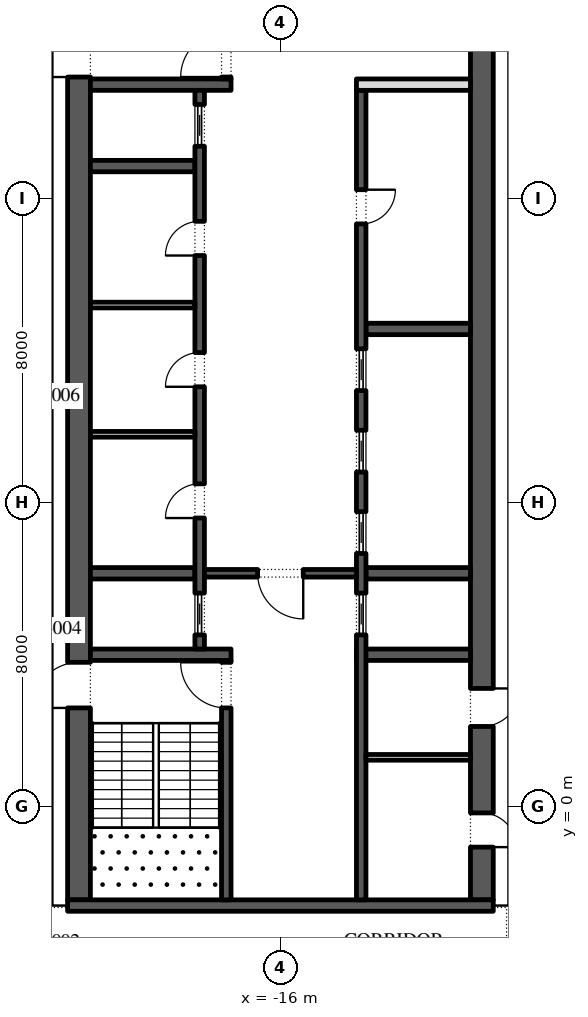
"""IFC4 building model, lengths in metres.
Left out: names, types, materials, properties, quantities, classifications, styles, units other than length and angle.
Written with IfcOpenShell. Run it as: python <this file> out.ifc"""

import sys

from ifc_helpers import new_model, si_unit, direction, frame, frame_2d, origin, place, context, subcontext, project, spatial, rectangle, extrude, element, fill, save


model = new_model("IFC4")
c1 = context("Model", 3, precision=1e-05, world=origin(), true_north=direction((0.0, 1.0)))
c2 = subcontext(c1, "Body", "Model", "MODEL_VIEW")
j1 = project(units=[si_unit("LENGTHUNIT", "METRE"), si_unit("PLANEANGLEUNIT", "RADIAN")], contexts=[c1])
p1 = place(None, origin())
s1 = spatial("IfcSite", under=j1, at=p1, CompositionType="ELEMENT")
p2 = place(p1, origin())
s2 = spatial("IfcBuilding", under=s1, at=p2, CompositionType="ELEMENT")
p3 = place(p2, frame((0.0, 0.0, 276.6)))
s3 = spatial("IfcBuildingStorey", under=s2, at=p3, CompositionType="ELEMENT", Elevation=276.6)
p4 = place(p3, frame((-21.359, 48.678, 0.0), z_axis=(0.0, 0.0, 1.0), x_axis=(-0.224949198343, -0.974370493275, 0.0)))
e1 = element("IfcWall", 1, at=p4, inside=s3, PredefinedType="STANDARD", context=c2, shape_type="SweptSolid", body=[
    extrude(rectangle(XDim=49.5, YDim=0.3, at=frame_2d((24.75, 0.0))), origin(), (0.0, 0.0, 1.0), 4.0),
])
p5 = place(p4, frame((1.157, 0.0, 0.45)))
e2 = element("IfcOpeningElement", 2, at=p5, cuts=e1, PredefinedType="OPENING", context=c2, shape_type="SweptSolid", body=[
    extrude(rectangle(XDim=4.5, YDim=3.05, at=frame_2d((2.25, 1.525))), frame((0.0, 0.16, 0.0), z_axis=(0.0, -1.0, 0.0), x_axis=(1.0, 0.0, 0.0)), (0.0, 0.0, 1.0), 0.32),
])
p6 = place(p4, frame((9.171, 0.0, 0.0)))
e3 = element("IfcOpeningElement", 3, at=p6, cuts=e1, PredefinedType="OPENING", context=c2, shape_type="SweptSolid", body=[
    extrude(rectangle(XDim=2.4, YDim=3.5, at=frame_2d((1.2, 1.75))), frame((0.0, 0.16, 0.0), z_axis=(0.0, -1.0, 0.0), x_axis=(1.0, 0.0, 0.0)), (0.0, 0.0, 1.0), 0.32),
])
p7 = place(p4, frame((15.236, 0.0, 0.45)))
e4 = element("IfcOpeningElement", 4, at=p7, cuts=e1, PredefinedType="OPENING", context=c2, shape_type="SweptSolid", body=[
    extrude(rectangle(XDim=4.5, YDim=3.05, at=frame_2d((2.25, 1.525))), frame((0.0, 0.16, 0.0), z_axis=(0.0, -1.0, 0.0), x_axis=(1.0, 0.0, 0.0)), (0.0, 0.0, 1.0), 0.32),
])
p8 = place(p4, frame((22.35, 0.0, 0.45)))
e5 = element("IfcOpeningElement", 5, at=p8, cuts=e1, PredefinedType="OPENING", context=c2, shape_type="SweptSolid", body=[
    extrude(rectangle(XDim=4.5, YDim=3.05, at=frame_2d((2.25, 1.525))), frame((0.0, 0.16, 0.0), z_axis=(0.0, -1.0, 0.0), x_axis=(1.0, 0.0, 0.0)), (0.0, 0.0, 1.0), 0.32),
])
p9 = place(p4, frame((29.464, 0.0, 0.45)))
e6 = element("IfcOpeningElement", 6, at=p9, cuts=e1, PredefinedType="OPENING", context=c2, shape_type="SweptSolid", body=[
    extrude(rectangle(XDim=4.5, YDim=3.05, at=frame_2d((2.25, 1.525))), frame((0.0, 0.16, 0.0), z_axis=(0.0, -1.0, 0.0), x_axis=(1.0, 0.0, 0.0)), (0.0, 0.0, 1.0), 0.32),
])
p10 = place(p4, frame((37.628, 0.0, 0.0)))
e7 = element("IfcOpeningElement", 7, at=p10, cuts=e1, PredefinedType="OPENING", context=c2, shape_type="SweptSolid", body=[
    extrude(rectangle(XDim=2.4, YDim=3.325, at=frame_2d((1.2, 1.663))), frame((0.0, 0.16, 0.0), z_axis=(0.0, -1.0, 0.0), x_axis=(1.0, 0.0, 0.0)), (0.0, 0.0, 1.0), 0.32),
])
p11 = place(p4, frame((43.693, 0.0, 0.45)))
e8 = element("IfcOpeningElement", 8, at=p11, cuts=e1, PredefinedType="OPENING", context=c2, shape_type="SweptSolid", body=[
    extrude(rectangle(XDim=4.5, YDim=2.825, at=frame_2d((2.25, 1.413))), frame((0.0, 0.16, 0.0), z_axis=(0.0, -1.0, 0.0), x_axis=(1.0, 0.0, 0.0)), (0.0, 0.0, 1.0), 0.32),
])
p12 = place(p3, frame((-21.3, -2.45, 0.0), z_axis=(0.0, 0.0, 1.0), x_axis=(0.0, 1.0, 0.0)))
e9 = element("IfcWall", 9, at=p12, inside=s3, PredefinedType="SHEAR", context=c2, shape_type="SweptSolid", body=[
    extrude(rectangle(XDim=27.9, YDim=0.6, at=frame_2d((13.95, 0.0))), origin(), (0.0, 0.0, 1.0), 4.0),
])
p13 = place(p12, frame((5.05, 0.0, 0.0)))
e10 = element("IfcOpeningElement", 10, at=p13, cuts=e9, PredefinedType="OPENING", context=c2, shape_type="SweptSolid", body=[
    extrude(rectangle(XDim=1.2, YDim=2.1, at=frame_2d((0.6, 1.05))), frame((0.0, 0.31, 0.0), z_axis=(0.0, -1.0, 0.0), x_axis=(1.0, 0.0, 0.0)), (0.0, 0.0, 1.0), 0.62),
])
p14 = place(p12, frame((21.65, 0.0, 0.0)))
e11 = element("IfcOpeningElement", 11, at=p14, cuts=e9, PredefinedType="OPENING", context=c2, shape_type="SweptSolid", body=[
    extrude(rectangle(XDim=1.2, YDim=2.1, at=frame_2d((0.6, 1.05))), frame((0.0, 0.31, 0.0), z_axis=(0.0, -1.0, 0.0), x_axis=(1.0, 0.0, 0.0)), (0.0, 0.0, 1.0), 0.62),
])
p15 = place(p3, frame((-10.7, -2.45, 0.0), z_axis=(0.0, 0.0, 1.0), x_axis=(0.0, 1.0, 0.0)))
e12 = element("IfcWall", 12, at=p15, inside=s3, PredefinedType="SHEAR", context=c2, shape_type="SweptSolid", body=[
    extrude(rectangle(XDim=27.9, YDim=0.6, at=frame_2d((13.95, 0.0))), origin(), (0.0, 0.0, 1.0), 4.0),
])
p16 = place(p15, frame((23.65, 0.0, 0.0)))
e13 = element("IfcOpeningElement", 13, at=p16, cuts=e12, PredefinedType="OPENING", context=c2, shape_type="SweptSolid", body=[
    extrude(rectangle(XDim=2.4, YDim=2.1, at=frame_2d((1.2, 1.05))), frame((0.0, 0.31, 0.0), z_axis=(0.0, -1.0, 0.0), x_axis=(1.0, 0.0, 0.0)), (0.0, 0.0, 1.0), 0.62),
])
p17 = place(p15, frame((1.387, 0.0, 0.0)))
e14 = element("IfcOpeningElement", 14, at=p17, cuts=e12, PredefinedType="OPENING", context=c2, shape_type="SweptSolid", body=[
    extrude(rectangle(XDim=0.9, YDim=2.1, at=frame_2d((0.45, 1.05))), frame((0.0, 0.31, 0.0), z_axis=(0.0, -1.0, 0.0), x_axis=(1.0, 0.0, 0.0)), (0.0, 0.0, 1.0), 0.62),
])
p18 = place(p15, frame((4.562, 0.0, 0.0)))
e15 = element("IfcOpeningElement", 15, at=p18, cuts=e12, PredefinedType="OPENING", context=c2, shape_type="SweptSolid", body=[
    extrude(rectangle(XDim=1.0, YDim=2.1, at=frame_2d((0.5, 1.05))), frame((0.0, 0.31, 0.0), z_axis=(0.0, -1.0, 0.0), x_axis=(1.0, 0.0, 0.0)), (0.0, 0.0, 1.0), 0.62),
])
p19 = place(p3, frame((-21.6, -2.6, 0.0), z_axis=(0.0, 0.0, 1.0), x_axis=(1.0, 0.0, 0.0)))
e16 = element("IfcWall", 16, at=p19, inside=s3, PredefinedType="SHEAR", context=c2, shape_type="SweptSolid", body=[
    extrude(rectangle(XDim=11.2, YDim=0.3, at=frame_2d((5.6, 0.0))), origin(), (0.0, 0.0, 1.0), 4.0),
])
p20 = place(p3, frame((-21.0, 4.0, 0.0), z_axis=(0.0, 0.0, 1.0), x_axis=(1.0, 0.0, 0.0)))
e17 = element("IfcWall", 17, at=p20, inside=s3, PredefinedType="SHEAR", context=c2, shape_type="SweptSolid", body=[
    extrude(rectangle(XDim=3.7, YDim=0.3, at=frame_2d((1.85, 0.0))), origin(), (0.0, 0.0, 1.0), 4.0),
])
p21 = place(p3, frame((-17.425, -2.45, 0.0), z_axis=(0.0, 0.0, 1.0), x_axis=(0.0, 1.0, 0.0)))
e18 = element("IfcWall", 18, at=p21, inside=s3, PredefinedType="SHEAR", context=c2, shape_type="SweptSolid", body=[
    extrude(rectangle(XDim=6.3, YDim=0.25, at=frame_2d((3.15, 0.0))), origin(), (0.0, 0.0, 1.0), 4.0),
])
p22 = place(p21, frame((5.05, 0.0, 0.0)))
e19 = element("IfcOpeningElement", 19, at=p22, cuts=e18, PredefinedType="OPENING", context=c2, shape_type="SweptSolid", body=[
    extrude(rectangle(XDim=1.2, YDim=2.1, at=frame_2d((0.6, 1.05))), frame((0.0, 0.135, 0.0), z_axis=(0.0, -1.0, 0.0), x_axis=(1.0, 0.0, 0.0)), (0.0, 0.0, 1.0), 0.27),
])
p23 = place(p3, frame((-21.0, 19.0, 0.0), z_axis=(0.0, 0.0, 1.0), x_axis=(1.0, 0.0, 0.0)))
e20 = element("IfcWall", 20, at=p23, inside=s3, PredefinedType="SHEAR", context=c2, shape_type="SweptSolid", body=[
    extrude(rectangle(XDim=3.7, YDim=0.3, at=frame_2d((1.85, 0.0))), origin(), (0.0, 0.0, 1.0), 4.0),
])
p24 = place(p3, frame((-17.425, 19.15, 0.0), z_axis=(0.0, 0.0, 1.0), x_axis=(0.0, 1.0, 0.0)))
e21 = element("IfcWall", 21, at=p24, inside=s3, PredefinedType="SHEAR", context=c2, shape_type="SweptSolid", body=[
    extrude(rectangle(XDim=6.3, YDim=0.25, at=frame_2d((3.15, 0.0))), origin(), (0.0, 0.0, 1.0), 4.0),
])
p25 = place(p24, frame((0.05, 0.0, 0.0)))
e22 = element("IfcOpeningElement", 22, at=p25, cuts=e21, PredefinedType="OPENING", context=c2, shape_type="SweptSolid", body=[
    extrude(rectangle(XDim=1.2, YDim=2.1, at=frame_2d((0.6, 1.05))), frame((0.0, 0.135, 0.0), z_axis=(0.0, -1.0, 0.0), x_axis=(1.0, 0.0, 0.0)), (0.0, 0.0, 1.0), 0.27),
])
for number, where, z_axis, x_axis in (
    (23, (-21.0, 6.143, 0.0), (0.0, 0.0, 1.0), (1.0, 0.0, 0.0)),
    (24, (-21.0, 16.857, 0.0), (0.0, 0.0, 1.0), (1.0, 0.0, 0.0)),
):
    element("IfcWall", number, at=place(p3, frame(where, z_axis=z_axis, x_axis=x_axis)), inside=s3, PredefinedType="SHEAR", context=c2, shape_type="SweptSolid", body=[
        extrude(rectangle(XDim=2.75, YDim=0.3, at=frame_2d((1.375, 0.0))), origin(), (0.0, 0.0, 1.0), 4.0),
    ])
p26 = place(p3, frame((-18.125, 4.15, 0.0), z_axis=(0.0, 0.0, 1.0), x_axis=(0.0, 1.0, 0.0)))
e25 = element("IfcWall", 25, at=p26, inside=s3, PredefinedType="SHEAR", context=c2, shape_type="SweptSolid", body=[
    extrude(rectangle(XDim=14.7, YDim=0.25, at=frame_2d((7.35, 0.0))), origin(), (0.0, 0.0, 1.0), 4.0),
])
p27 = place(p26, frame((3.446, 0.0, 0.0)))
e26 = element("IfcOpeningElement", 26, at=p27, cuts=e25, PredefinedType="OPENING", context=c2, shape_type="SweptSolid", body=[
    extrude(rectangle(XDim=0.9, YDim=2.1, at=frame_2d((0.45, 1.05))), frame((0.0, 0.135, 0.0), z_axis=(0.0, -1.0, 0.0), x_axis=(1.0, 0.0, 0.0)), (0.0, 0.0, 1.0), 0.27),
])
p28 = place(p26, frame((6.9, 0.0, 0.0)))
e27 = element("IfcOpeningElement", 27, at=p28, cuts=e25, PredefinedType="OPENING", context=c2, shape_type="SweptSolid", body=[
    extrude(rectangle(XDim=0.9, YDim=2.1, at=frame_2d((0.45, 1.05))), frame((0.0, 0.135, 0.0), z_axis=(0.0, -1.0, 0.0), x_axis=(1.0, 0.0, 0.0)), (0.0, 0.0, 1.0), 0.27),
])
p29 = place(p26, frame((10.354, 0.0, 0.0)))
e28 = element("IfcOpeningElement", 28, at=p29, cuts=e25, PredefinedType="OPENING", context=c2, shape_type="SweptSolid", body=[
    extrude(rectangle(XDim=0.9, YDim=2.1, at=frame_2d((0.45, 1.05))), frame((0.0, 0.135, 0.0), z_axis=(0.0, -1.0, 0.0), x_axis=(1.0, 0.0, 0.0)), (0.0, 0.0, 1.0), 0.27),
])
p30 = place(p26, frame((0.371, 0.0, 0.0)))
e29 = element("IfcOpeningElement", 29, at=p30, cuts=e25, PredefinedType="OPENING", context=c2, shape_type="SweptSolid", body=[
    extrude(rectangle(XDim=1.1, YDim=2.1, at=frame_2d((0.55, 1.05))), frame((0.0, 0.135, 0.0), z_axis=(0.0, -1.0, 0.0), x_axis=(1.0, 0.0, 0.0)), (0.0, 0.0, 1.0), 0.27),
])
p31 = place(p26, frame((13.229, 0.0, 0.0)))
e30 = element("IfcOpeningElement", 30, at=p31, cuts=e25, PredefinedType="OPENING", context=c2, shape_type="SweptSolid", body=[
    extrude(rectangle(XDim=1.1, YDim=2.1, at=frame_2d((0.55, 1.05))), frame((0.0, 0.135, 0.0), z_axis=(0.0, -1.0, 0.0), x_axis=(1.0, 0.0, 0.0)), (0.0, 0.0, 1.0), 0.27),
])
for number, where, z_axis, x_axis in (
    (31, (-21.0, 9.8, 0.0), (0.0, 0.0, 1.0), (1.0, 0.0, 0.0)),
    (32, (-21.0, 13.2, 0.0), (0.0, 0.0, 1.0), (1.0, 0.0, 0.0)),
):
    element("IfcWall", number, at=place(p3, frame(where, z_axis=z_axis, x_axis=x_axis)), inside=s3, PredefinedType="PARTITIONING", context=c2, shape_type="SweptSolid", body=[
        extrude(rectangle(XDim=2.75, YDim=0.15, at=frame_2d((1.375, 0.0))), origin(), (0.0, 0.0, 1.0), 4.0),
    ])
p32 = place(p3, frame((-14.0, 4.0, 0.0), z_axis=(0.0, 0.0, 1.0), x_axis=(1.0, 0.0, 0.0)))
e33 = element("IfcWall", 33, at=p32, inside=s3, PredefinedType="SHEAR", context=c2, shape_type="SweptSolid", body=[
    extrude(rectangle(XDim=3.0, YDim=0.3, at=frame_2d((1.5, 0.0))), origin(), (0.0, 0.0, 1.0), 4.0),
])
for number, where, z_axis, x_axis in (
    (34, (-13.75, 6.143, 0.0), (0.0, 0.0, 1.0), (1.0, 0.0, 0.0)),
    (35, (-13.75, 12.571, 0.0), (0.0, 0.0, 1.0), (1.0, 0.0, 0.0)),
):
    element("IfcWall", number, at=place(p3, frame(where, z_axis=z_axis, x_axis=x_axis)), inside=s3, PredefinedType="SHEAR", context=c2, shape_type="SweptSolid", body=[
        extrude(rectangle(XDim=2.75, YDim=0.3, at=frame_2d((1.375, 0.0))), origin(), (0.0, 0.0, 1.0), 4.0),
    ])
p33 = place(p3, frame((-13.875, -2.45, 0.0), z_axis=(0.0, 0.0, 1.0), x_axis=(0.0, 1.0, 0.0)))
e36 = element("IfcWall", 36, at=p33, inside=s3, PredefinedType="SHEAR", context=c2, shape_type="SweptSolid", body=[
    extrude(rectangle(XDim=21.3, YDim=0.25, at=frame_2d((10.65, 0.0))), origin(), (0.0, 0.0, 1.0), 4.0),
])
p34 = place(p33, frame((17.786, 0.0, 0.0)))
e37 = element("IfcOpeningElement", 37, at=p34, cuts=e36, PredefinedType="OPENING", context=c2, shape_type="SweptSolid", body=[
    extrude(rectangle(XDim=0.9, YDim=2.1, at=frame_2d((0.45, 1.05))), frame((0.0, 0.135, 0.0), z_axis=(0.0, -1.0, 0.0), x_axis=(1.0, 0.0, 0.0)), (0.0, 0.0, 1.0), 0.27),
])
p35 = place(p33, frame((6.971, 0.0, 0.0)))
e38 = element("IfcOpeningElement", 38, at=p35, cuts=e36, PredefinedType="OPENING", context=c2, shape_type="SweptSolid", body=[
    extrude(rectangle(XDim=1.1, YDim=2.1, at=frame_2d((0.55, 1.05))), frame((0.0, 0.135, 0.0), z_axis=(0.0, -1.0, 0.0), x_axis=(1.0, 0.0, 0.0)), (0.0, 0.0, 1.0), 0.27),
])
p36 = place(p33, frame((9.114, 0.0, 0.0)))
e39 = element("IfcOpeningElement", 39, at=p36, cuts=e36, PredefinedType="OPENING", context=c2, shape_type="SweptSolid", body=[
    extrude(rectangle(XDim=1.1, YDim=2.1, at=frame_2d((0.55, 1.05))), frame((0.0, 0.135, 0.0), z_axis=(0.0, -1.0, 0.0), x_axis=(1.0, 0.0, 0.0)), (0.0, 0.0, 1.0), 0.27),
])
p37 = place(p33, frame((11.257, 0.0, 0.0)))
e40 = element("IfcOpeningElement", 40, at=p37, cuts=e36, PredefinedType="OPENING", context=c2, shape_type="SweptSolid", body=[
    extrude(rectangle(XDim=1.1, YDim=2.1, at=frame_2d((0.55, 1.05))), frame((0.0, 0.135, 0.0), z_axis=(0.0, -1.0, 0.0), x_axis=(1.0, 0.0, 0.0)), (0.0, 0.0, 1.0), 0.27),
])
p38 = place(p33, frame((13.4, 0.0, 0.0)))
e41 = element("IfcOpeningElement", 41, at=p38, cuts=e36, PredefinedType="OPENING", context=c2, shape_type="SweptSolid", body=[
    extrude(rectangle(XDim=1.1, YDim=2.1, at=frame_2d((0.55, 1.05))), frame((0.0, 0.135, 0.0), z_axis=(0.0, -1.0, 0.0), x_axis=(1.0, 0.0, 0.0)), (0.0, 0.0, 1.0), 0.27),
])
p39 = place(p3, frame((-14.0, 19.0, 0.0), z_axis=(0.0, 0.0, 1.0), x_axis=(1.0, 0.0, 0.0)))
e42 = element("IfcWall", 42, at=p39, inside=s3, PredefinedType="PARTITIONING", context=c2, shape_type="SweptSolid", body=[
    extrude(rectangle(XDim=3.0, YDim=0.3, at=frame_2d((1.5, 0.0))), origin(), (0.0, 0.0, 1.0), 4.0),
])
p40 = place(p3, frame((-18.0, 6.143, 0.0), z_axis=(0.0, 0.0, 1.0), x_axis=(1.0, 0.0, 0.0)))
e43 = element("IfcWall", 43, at=p40, inside=s3, PredefinedType="SHEAR", context=c2, shape_type="SweptSolid", body=[
    extrude(rectangle(XDim=4.0, YDim=0.2, at=frame_2d((2.0, 0.0))), origin(), (0.0, 0.0, 1.0), 4.0),
])
p41 = place(p40, frame((1.4, 0.0, 0.0)))
e44 = element("IfcOpeningElement", 44, at=p41, cuts=e43, PredefinedType="OPENING", context=c2, shape_type="SweptSolid", body=[
    extrude(rectangle(XDim=1.2, YDim=2.1, at=frame_2d((0.6, 1.05))), frame((0.0, 0.11, 0.0), z_axis=(0.0, -1.0, 0.0), x_axis=(1.0, 0.0, 0.0)), (0.0, 0.0, 1.0), 0.22),
])
p42 = place(p3, frame((-13.75, 1.3, 0.0), z_axis=(0.0, 0.0, 1.0), x_axis=(1.0, 0.0, 0.0)))
e45 = element("IfcWall", 45, at=p42, inside=s3, PredefinedType="PARTITIONING", context=c2, shape_type="SweptSolid", body=[
    extrude(rectangle(XDim=2.75, YDim=0.15, at=frame_2d((1.375, 0.0))), origin(), (0.0, 0.0, 1.0), 4.0),
])
p43 = place(p27, origin())
e46 = element("IfcDoor", 46, at=p43, inside=s3, OperationType="SINGLE_SWING_RIGHT", PredefinedType="DOOR", context=c2, shape_type="SweptSolid", body=[
    extrude(rectangle(XDim=0.9, YDim=2.1, at=frame_2d((0.45, 1.05))), frame((0.0, 0.125, 0.0), z_axis=(0.0, -1.0, 0.0), x_axis=(1.0, 0.0, 0.0)), (0.0, 0.0, 1.0), 0.05),
])
fill(e26, e46)
p44 = place(p28, origin())
e47 = element("IfcDoor", 47, at=p44, inside=s3, OperationType="SINGLE_SWING_RIGHT", PredefinedType="DOOR", context=c2, shape_type="SweptSolid", body=[
    extrude(rectangle(XDim=0.9, YDim=2.1, at=frame_2d((0.45, 1.05))), frame((0.0, 0.125, 0.0), z_axis=(0.0, -1.0, 0.0), x_axis=(1.0, 0.0, 0.0)), (0.0, 0.0, 1.0), 0.05),
])
fill(e27, e47)
p45 = place(p29, origin())
e48 = element("IfcDoor", 48, at=p45, inside=s3, OperationType="SINGLE_SWING_RIGHT", PredefinedType="DOOR", context=c2, shape_type="SweptSolid", body=[
    extrude(rectangle(XDim=0.9, YDim=2.1, at=frame_2d((0.45, 1.05))), frame((0.0, 0.125, 0.0), z_axis=(0.0, -1.0, 0.0), x_axis=(1.0, 0.0, 0.0)), (0.0, 0.0, 1.0), 0.05),
])
fill(e28, e48)
p46 = place(p30, origin())
e49 = element("IfcDoor", 49, at=p46, inside=s3, OperationType="SLIDING_TO_LEFT", PredefinedType="DOOR", context=c2, shape_type="SweptSolid", body=[
    extrude(rectangle(XDim=1.1, YDim=2.1, at=frame_2d((0.55, 1.05))), frame((0.0, 0.025, 0.0), z_axis=(0.0, -1.0, 0.0), x_axis=(1.0, 0.0, 0.0)), (0.0, 0.0, 1.0), 0.05),
])
fill(e29, e49)
p47 = place(p31, origin())
e50 = element("IfcDoor", 50, at=p47, inside=s3, OperationType="SLIDING_TO_LEFT", PredefinedType="DOOR", context=c2, shape_type="SweptSolid", body=[
    extrude(rectangle(XDim=1.1, YDim=2.1, at=frame_2d((0.55, 1.05))), frame((0.0, 0.025, 0.0), z_axis=(0.0, -1.0, 0.0), x_axis=(1.0, 0.0, 0.0)), (0.0, 0.0, 1.0), 0.05),
])
fill(e30, e50)
p48 = place(p34, frame((0.9, -0.2, 0.0), z_axis=(0.0, 0.0, 1.0), x_axis=(-1.0, 0.0, 0.0)))
e51 = element("IfcDoor", 51, at=p48, inside=s3, OperationType="SINGLE_SWING_RIGHT", PredefinedType="DOOR", context=c2, shape_type="SweptSolid", body=[
    extrude(rectangle(XDim=0.9, YDim=2.1, at=frame_2d((0.45, 1.05))), frame((0.0, -0.075, 0.0), z_axis=(0.0, -1.0, 0.0), x_axis=(1.0, 0.0, 0.0)), (0.0, 0.0, 1.0), 0.05),
])
fill(e37, e51)
p49 = place(p35, origin())
e52 = element("IfcDoor", 52, at=p49, inside=s3, OperationType="SLIDING_TO_LEFT", PredefinedType="DOOR", context=c2, shape_type="SweptSolid", body=[
    extrude(rectangle(XDim=1.1, YDim=2.1, at=frame_2d((0.55, 1.05))), frame((0.0, 0.025, 0.0), z_axis=(0.0, -1.0, 0.0), x_axis=(1.0, 0.0, 0.0)), (0.0, 0.0, 1.0), 0.05),
])
fill(e38, e52)
p50 = place(p36, origin())
e53 = element("IfcDoor", 53, at=p50, inside=s3, OperationType="SLIDING_TO_LEFT", PredefinedType="DOOR", context=c2, shape_type="SweptSolid", body=[
    extrude(rectangle(XDim=1.1, YDim=2.1, at=frame_2d((0.55, 1.05))), frame((0.0, 0.025, 0.0), z_axis=(0.0, -1.0, 0.0), x_axis=(1.0, 0.0, 0.0)), (0.0, 0.0, 1.0), 0.05),
])
fill(e39, e53)
p51 = place(p37, origin())
e54 = element("IfcDoor", 54, at=p51, inside=s3, OperationType="SLIDING_TO_LEFT", PredefinedType="DOOR", context=c2, shape_type="SweptSolid", body=[
    extrude(rectangle(XDim=1.1, YDim=2.1, at=frame_2d((0.55, 1.05))), frame((0.0, 0.025, 0.0), z_axis=(0.0, -1.0, 0.0), x_axis=(1.0, 0.0, 0.0)), (0.0, 0.0, 1.0), 0.05),
])
fill(e40, e54)
p52 = place(p38, origin())
e55 = element("IfcDoor", 55, at=p52, inside=s3, OperationType="SLIDING_TO_LEFT", PredefinedType="DOOR", context=c2, shape_type="SweptSolid", body=[
    extrude(rectangle(XDim=1.1, YDim=2.1, at=frame_2d((0.55, 1.05))), frame((0.0, 0.025, 0.0), z_axis=(0.0, -1.0, 0.0), x_axis=(1.0, 0.0, 0.0)), (0.0, 0.0, 1.0), 0.05),
])
fill(e41, e55)
p53 = place(p41, frame((1.2, 0.0, 0.0), z_axis=(0.0, 0.0, 1.0), x_axis=(-1.0, 0.0, 0.0)))
e56 = element("IfcDoor", 56, at=p53, inside=s3, OperationType="SINGLE_SWING_RIGHT", PredefinedType="DOOR", context=c2, shape_type="SweptSolid", body=[
    extrude(rectangle(XDim=1.2, YDim=2.1, at=frame_2d((0.6, 1.05))), frame((0.0, 0.025, 0.0), z_axis=(0.0, -1.0, 0.0), x_axis=(1.0, 0.0, 0.0)), (0.0, 0.0, 1.0), 0.05),
])
fill(e44, e56)
p54 = place(p22, origin())
e57 = element("IfcDoor", 57, at=p54, inside=s3, OperationType="SINGLE_SWING_LEFT", PredefinedType="DOOR", context=c2, shape_type="SweptSolid", body=[
    extrude(rectangle(XDim=1.2, YDim=2.1, at=frame_2d((0.6, 1.05))), frame((0.0, 0.025, 0.0), z_axis=(0.0, -1.0, 0.0), x_axis=(1.0, 0.0, 0.0)), (0.0, 0.0, 1.0), 0.05),
])
fill(e19, e57)
p55 = place(p13, origin())
e58 = element("IfcDoor", 58, at=p55, inside=s3, OperationType="SINGLE_SWING_RIGHT", PredefinedType="DOOR", context=c2, shape_type="SweptSolid", body=[
    extrude(rectangle(XDim=1.2, YDim=2.1, at=frame_2d((0.6, 1.05))), frame((0.0, 0.025, 0.0), z_axis=(0.0, -1.0, 0.0), x_axis=(1.0, 0.0, 0.0)), (0.0, 0.0, 1.0), 0.05),
])
fill(e10, e58)
p56 = place(p25, origin())
e59 = element("IfcDoor", 59, at=p56, inside=s3, OperationType="SINGLE_SWING_RIGHT", PredefinedType="DOOR", context=c2, shape_type="SweptSolid", body=[
    extrude(rectangle(XDim=1.2, YDim=2.1, at=frame_2d((0.6, 1.05))), frame((0.0, 0.025, 0.0), z_axis=(0.0, -1.0, 0.0), x_axis=(1.0, 0.0, 0.0)), (0.0, 0.0, 1.0), 0.05),
])
fill(e22, e59)
p57 = place(p14, origin())
e60 = element("IfcDoor", 60, at=p57, inside=s3, OperationType="SINGLE_SWING_RIGHT", PredefinedType="DOOR", context=c2, shape_type="SweptSolid", body=[
    extrude(rectangle(XDim=1.2, YDim=2.1, at=frame_2d((0.6, 1.05))), frame((0.0, 0.025, 0.0), z_axis=(0.0, -1.0, 0.0), x_axis=(1.0, 0.0, 0.0)), (0.0, 0.0, 1.0), 0.05),
])
fill(e11, e60)
p58 = place(p17, frame((0.9, 0.55, 0.0), z_axis=(0.0, 0.0, 1.0), x_axis=(-1.0, 0.0, 0.0)))
e61 = element("IfcDoor", 61, at=p58, inside=s3, OperationType="SINGLE_SWING_LEFT", PredefinedType="DOOR", context=c2, shape_type="SweptSolid", body=[
    extrude(rectangle(XDim=0.9, YDim=2.1, at=frame_2d((0.45, 1.05))), frame((0.0, 0.3, 0.0), z_axis=(0.0, -1.0, 0.0), x_axis=(1.0, 0.0, 0.0)), (0.0, 0.0, 1.0), 0.05),
])
fill(e14, e61)
p59 = place(p18, frame((1.0, 0.55, 0.0), z_axis=(0.0, 0.0, 1.0), x_axis=(-1.0, 0.0, 0.0)))
e62 = element("IfcDoor", 62, at=p59, inside=s3, OperationType="SINGLE_SWING_RIGHT", PredefinedType="DOOR", context=c2, shape_type="SweptSolid", body=[
    extrude(rectangle(XDim=1.0, YDim=2.1, at=frame_2d((0.5, 1.05))), frame((0.0, 0.3, 0.0), z_axis=(0.0, -1.0, 0.0), x_axis=(1.0, 0.0, 0.0)), (0.0, 0.0, 1.0), 0.05),
])
fill(e15, e62)
save(model, sys.argv[1])
